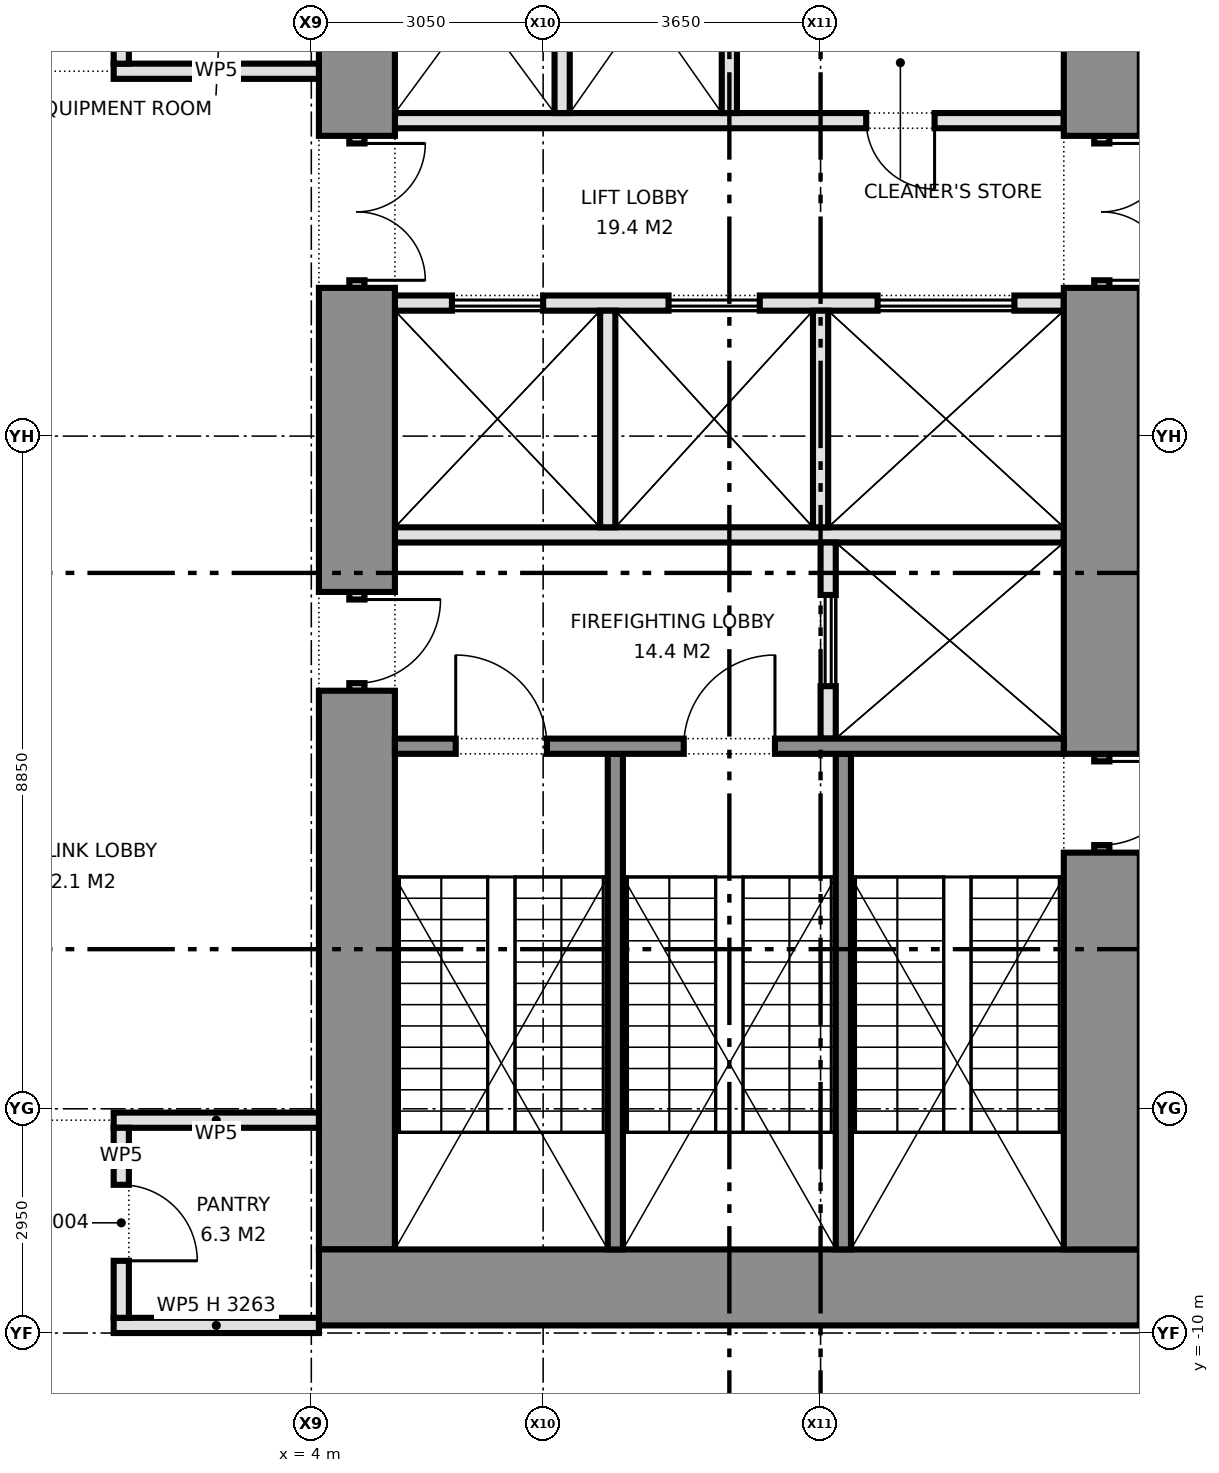
"""IFC4 building model, lengths in metres.
Left out: names, types, materials, properties, quantities, classifications, styles, units other than length and angle.
Written with IfcOpenShell. Run it as: python <this file> out.ifc"""

import sys

from ifc_helpers import new_model, si_unit, direction, frame, frame_2d, origin, place, context, subcontext, project, spatial, rectangle, extrude, element, fill, save


model = new_model("IFC4")
c1 = context("Model", 3, precision=1e-05, world=origin(), true_north=direction((0.0, 1.0)))
c2 = subcontext(c1, "Body", "Model", "MODEL_VIEW")
j1 = project(units=[si_unit("LENGTHUNIT", "METRE"), si_unit("PLANEANGLEUNIT", "RADIAN")], contexts=[c1])
p1 = place(None, origin())
s1 = spatial("IfcSite", under=j1, at=p1, CompositionType="ELEMENT")
p2 = place(p1, origin())
s2 = spatial("IfcBuilding", under=s1, at=p2, CompositionType="ELEMENT")
p3 = place(p2, frame((0.0, 0.0, 104.0)))
s3 = spatial("IfcBuildingStorey", under=s2, at=p3, CompositionType="ELEMENT", Elevation=104.0)
p4 = place(p3, frame((14.9, -9.4, 0.0), z_axis=(0.0, 0.0, 1.0), x_axis=(-1.0, 0.0, 0.0)))
e1 = element("IfcWall", 1, at=p4, inside=s3, PredefinedType="SHEAR", context=c2, shape_type="SweptSolid", body=[
    extrude(rectangle(XDim=10.8, YDim=1.0, at=frame_2d((5.4, 0.0))), origin(), (0.0, 0.0, 1.0), 4.2),
])
p5 = place(p3, frame((14.4, 8.9, 0.0), z_axis=(0.0, 0.0, 1.0), x_axis=(0.0, -1.0, 0.0)))
e2 = element("IfcWall", 2, at=p5, inside=s3, PredefinedType="SHEAR", context=c2, shape_type="SweptSolid", body=[
    extrude(rectangle(XDim=3.15, YDim=1.0, at=frame_2d((1.575, 0.0))), origin(), (0.0, 0.0, 1.0), 4.2),
])
p6 = place(p3, frame((14.4, 5.75, 0.0), z_axis=(0.0, 0.0, 1.0), x_axis=(0.0, -1.0, 0.0)))
e3 = element("IfcWall", 3, at=p6, inside=s3, PredefinedType="PARTITIONING", context=c2, shape_type="SweptSolid", body=[
    extrude(rectangle(XDim=2.0, YDim=0.2, at=frame_2d((1.0, 0.0))), origin(), (0.0, 0.0, 1.0), 2.4),
])
p7 = place(p6, frame((0.1, 0.0, 0.0)))
e4 = element("IfcOpeningElement", 4, at=p7, cuts=e3, PredefinedType="OPENING", context=c2, shape_type="SweptSolid", body=[
    extrude(rectangle(XDim=1.8, YDim=2.1, at=frame_2d((0.9, 1.05))), frame((0.0, 0.11, 0.0), z_axis=(0.0, -1.0, 0.0), x_axis=(1.0, 0.0, 0.0)), (0.0, 0.0, 1.0), 0.22),
])
p8 = place(p3, frame((14.4, 3.75, 0.0), z_axis=(0.0, 0.0, 1.0), x_axis=(0.0, -1.0, 0.0)))
e5 = element("IfcWall", 5, at=p8, inside=s3, PredefinedType="SHEAR", context=c2, shape_type="SweptSolid", body=[
    extrude(rectangle(XDim=6.13, YDim=1.0, at=frame_2d((3.065, 0.0))), origin(), (0.0, 0.0, 1.0), 4.2),
])
p9 = place(p3, frame((14.4, -2.38, 0.0), z_axis=(0.0, 0.0, 1.0), x_axis=(0.0, -1.0, 0.0)))
e6 = element("IfcWall", 6, at=p9, inside=s3, PredefinedType="SHEAR", context=c2, shape_type="SweptSolid", body=[
    extrude(rectangle(XDim=1.3, YDim=0.2, at=frame_2d((0.65, 0.0))), origin(), (0.0, 0.0, 1.0), 2.4),
])
p10 = place(p9, frame((0.1, 0.0, 0.0)))
e7 = element("IfcOpeningElement", 7, at=p10, cuts=e6, PredefinedType="OPENING", context=c2, shape_type="SweptSolid", body=[
    extrude(rectangle(XDim=1.1, YDim=2.1, at=frame_2d((0.55, 1.05))), frame((0.0, 0.11, 0.0), z_axis=(0.0, -1.0, 0.0), x_axis=(1.0, 0.0, 0.0)), (0.0, 0.0, 1.0), 0.22),
])
p11 = place(p3, frame((14.4, -3.68, 0.0), z_axis=(0.0, 0.0, 1.0), x_axis=(0.0, -1.0, 0.0)))
e8 = element("IfcWall", 8, at=p11, inside=s3, PredefinedType="SHEAR", context=c2, shape_type="SweptSolid", body=[
    extrude(rectangle(XDim=5.22, YDim=1.0, at=frame_2d((2.61, 0.0))), origin(), (0.0, 0.0, 1.0), 4.2),
])
p12 = place(p3, frame((4.6, 8.9, 0.0), z_axis=(0.0, 0.0, 1.0), x_axis=(0.0, -1.0, 0.0)))
e9 = element("IfcWall", 9, at=p12, inside=s3, PredefinedType="SHEAR", context=c2, shape_type="SweptSolid", body=[
    extrude(rectangle(XDim=3.15, YDim=1.0, at=frame_2d((1.575, 0.0))), origin(), (0.0, 0.0, 1.0), 4.2),
])
p13 = place(p3, frame((4.6, 5.75, 0.0), z_axis=(0.0, 0.0, 1.0), x_axis=(0.0, -1.0, 0.0)))
e10 = element("IfcWall", 10, at=p13, inside=s3, PredefinedType="PARTITIONING", context=c2, shape_type="SweptSolid", body=[
    extrude(rectangle(XDim=2.0, YDim=0.2, at=frame_2d((1.0, 0.0))), origin(), (0.0, 0.0, 1.0), 2.4),
])
p14 = place(p13, frame((0.1, 0.0, 0.0)))
e11 = element("IfcOpeningElement", 11, at=p14, cuts=e10, PredefinedType="OPENING", context=c2, shape_type="SweptSolid", body=[
    extrude(rectangle(XDim=1.8, YDim=2.1, at=frame_2d((0.9, 1.05))), frame((0.0, 0.11, 0.0), z_axis=(0.0, -1.0, 0.0), x_axis=(1.0, 0.0, 0.0)), (0.0, 0.0, 1.0), 0.22),
])
p15 = place(p3, frame((4.6, 3.75, 0.0), z_axis=(0.0, 0.0, 1.0), x_axis=(0.0, -1.0, 0.0)))
e12 = element("IfcWall", 12, at=p15, inside=s3, PredefinedType="SHEAR", context=c2, shape_type="SweptSolid", body=[
    extrude(rectangle(XDim=4.0, YDim=1.0, at=frame_2d((2.0, 0.0))), origin(), (0.0, 0.0, 1.0), 4.2),
])
p16 = place(p3, frame((4.6, -0.25, 0.0), z_axis=(0.0, 0.0, 1.0), x_axis=(0.0, -1.0, 0.0)))
e13 = element("IfcWall", 13, at=p16, inside=s3, PredefinedType="PARTITIONING", context=c2, shape_type="SweptSolid", body=[
    extrude(rectangle(XDim=1.3, YDim=0.2, at=frame_2d((0.65, 0.0))), origin(), (0.0, 0.0, 1.0), 2.4),
])
p17 = place(p16, frame((0.1, 0.0, 0.0)))
e14 = element("IfcOpeningElement", 14, at=p17, cuts=e13, PredefinedType="OPENING", context=c2, shape_type="SweptSolid", body=[
    extrude(rectangle(XDim=1.1, YDim=2.1, at=frame_2d((0.55, 1.05))), frame((0.0, 0.11, 0.0), z_axis=(0.0, -1.0, 0.0), x_axis=(1.0, 0.0, 0.0)), (0.0, 0.0, 1.0), 0.22),
])
p18 = place(p3, frame((4.6, -1.55, 0.0), z_axis=(0.0, 0.0, 1.0), x_axis=(0.0, -1.0, 0.0)))
e15 = element("IfcWall", 15, at=p18, inside=s3, PredefinedType="SHEAR", context=c2, shape_type="SweptSolid", body=[
    extrude(rectangle(XDim=7.35, YDim=1.0, at=frame_2d((3.675, 0.0))), origin(), (0.0, 0.0, 1.0), 4.2),
])
p19 = place(p3, frame((13.9, 5.95, 0.0), z_axis=(0.0, 0.0, 1.0), x_axis=(-1.0, 0.0, 0.0)))
e16 = element("IfcWall", 16, at=p19, inside=s3, PredefinedType="PARTITIONING", context=c2, shape_type="SweptSolid", body=[
    extrude(rectangle(XDim=8.8, YDim=0.2, at=frame_2d((4.4, 0.0))), origin(), (0.0, 0.0, 1.0), 4.2),
])
p20 = place(p19, frame((1.7, 0.0, 0.0)))
e17 = element("IfcOpeningElement", 17, at=p20, cuts=e16, PredefinedType="OPENING", context=c2, shape_type="SweptSolid", body=[
    extrude(rectangle(XDim=0.9, YDim=2.1, at=frame_2d((0.45, 1.05))), frame((0.0, 0.11, 0.0), z_axis=(0.0, -1.0, 0.0), x_axis=(1.0, 0.0, 0.0)), (0.0, 0.0, 1.0), 0.22),
])
p21 = place(p3, frame((13.9, 3.55, 0.0), z_axis=(0.0, 0.0, 1.0), x_axis=(-1.0, 0.0, 0.0)))
e18 = element("IfcWall", 18, at=p21, inside=s3, PredefinedType="PARTITIONING", context=c2, shape_type="SweptSolid", body=[
    extrude(rectangle(XDim=8.8, YDim=0.2, at=frame_2d((4.4, 0.0))), origin(), (0.0, 0.0, 1.0), 4.2),
])
p22 = place(p21, frame((0.65, 0.0, 0.0)))
e19 = element("IfcOpeningElement", 19, at=p22, cuts=e18, PredefinedType="OPENING", context=c2, shape_type="SweptSolid", body=[
    extrude(rectangle(XDim=1.8, YDim=2.1, at=frame_2d((0.9, 1.05))), frame((0.0, 0.11, 0.0), z_axis=(0.0, -1.0, 0.0), x_axis=(1.0, 0.0, 0.0)), (0.0, 0.0, 1.0), 0.22),
])
p23 = place(p21, frame((4.0, 0.0, 0.0)))
e20 = element("IfcOpeningElement", 20, at=p23, cuts=e18, PredefinedType="OPENING", context=c2, shape_type="SweptSolid", body=[
    extrude(rectangle(XDim=1.2, YDim=2.1, at=frame_2d((0.6, 1.05))), frame((0.0, 0.11, 0.0), z_axis=(0.0, -1.0, 0.0), x_axis=(1.0, 0.0, 0.0)), (0.0, 0.0, 1.0), 0.22),
])
p24 = place(p21, frame((6.85, 0.0, 0.0)))
e21 = element("IfcOpeningElement", 21, at=p24, cuts=e18, PredefinedType="OPENING", context=c2, shape_type="SweptSolid", body=[
    extrude(rectangle(XDim=1.2, YDim=2.1, at=frame_2d((0.6, 1.05))), frame((0.0, 0.11, 0.0), z_axis=(0.0, -1.0, 0.0), x_axis=(1.0, 0.0, 0.0)), (0.0, 0.0, 1.0), 0.22),
])
p25 = place(p3, frame((13.9, 0.5, 0.0), z_axis=(0.0, 0.0, 1.0), x_axis=(-1.0, 0.0, 0.0)))
e22 = element("IfcWall", 22, at=p25, inside=s3, PredefinedType="PARTITIONING", context=c2, shape_type="SweptSolid", body=[
    extrude(rectangle(XDim=8.8, YDim=0.2, at=frame_2d((4.4, 0.0))), origin(), (0.0, 0.0, 1.0), 4.2),
])
p26 = place(p3, frame((10.8, 0.4, 0.0), z_axis=(0.0, 0.0, 1.0), x_axis=(0.0, -1.0, 0.0)))
e23 = element("IfcWall", 23, at=p26, inside=s3, PredefinedType="PARTITIONING", context=c2, shape_type="SweptSolid", body=[
    extrude(rectangle(XDim=2.58, YDim=0.2, at=frame_2d((1.29, 0.0))), origin(), (0.0, 0.0, 1.0), 4.2),
])
p27 = place(p26, frame((0.69, 0.0, 0.0)))
e24 = element("IfcOpeningElement", 24, at=p27, cuts=e23, PredefinedType="OPENING", context=c2, shape_type="SweptSolid", body=[
    extrude(rectangle(XDim=1.2, YDim=2.1, at=frame_2d((0.6, 1.05))), frame((0.0, 0.11, 0.0), z_axis=(0.0, -1.0, 0.0), x_axis=(1.0, 0.0, 0.0)), (0.0, 0.0, 1.0), 0.22),
])
p28 = place(p3, frame((13.9, -2.28, 0.0), z_axis=(0.0, 0.0, 1.0), x_axis=(-1.0, 0.0, 0.0)))
e25 = element("IfcWall", 25, at=p28, inside=s3, PredefinedType="SHEAR", context=c2, shape_type="SweptSolid", body=[
    extrude(rectangle(XDim=8.8, YDim=0.2, at=frame_2d((4.4, 0.0))), origin(), (0.0, 0.0, 1.0), 4.2),
])
p29 = place(p28, frame((3.8, 0.0, 0.0)))
e26 = element("IfcOpeningElement", 26, at=p29, cuts=e25, PredefinedType="OPENING", context=c2, shape_type="SweptSolid", body=[
    extrude(rectangle(XDim=1.2, YDim=2.1, at=frame_2d((0.6, 1.05))), frame((0.0, 0.11, 0.0), z_axis=(0.0, -1.0, 0.0), x_axis=(1.0, 0.0, 0.0)), (0.0, 0.0, 1.0), 0.22),
])
p30 = place(p28, frame((6.8, 0.0, 0.0)))
e27 = element("IfcOpeningElement", 27, at=p30, cuts=e25, PredefinedType="OPENING", context=c2, shape_type="SweptSolid", body=[
    extrude(rectangle(XDim=1.2, YDim=2.1, at=frame_2d((0.6, 1.05))), frame((0.0, 0.11, 0.0), z_axis=(0.0, -1.0, 0.0), x_axis=(1.0, 0.0, 0.0)), (0.0, 0.0, 1.0), 0.22),
])
for number, where, z_axis, x_axis in (
    (28, (11.0, -2.38, 0.0), (0.0, 0.0, 1.0), (0.0, -1.0, 0.0)),
    (29, (8.0, -2.38, 0.0), (0.0, 0.0, 1.0), (0.0, -1.0, 0.0)),
):
    element("IfcWall", number, at=place(p3, frame(where, z_axis=z_axis, x_axis=x_axis)), inside=s3, PredefinedType="SHEAR", context=c2, shape_type="SweptSolid", body=[
        extrude(rectangle(XDim=6.52, YDim=0.2, at=frame_2d((3.26, 0.0))), origin(), (0.0, 0.0, 1.0), 4.2),
    ])
for number, where, z_axis, x_axis in (
    (30, (9.5, 8.9, 0.0), (0.0, 0.0, 1.0), (0.0, -1.0, 0.0)),
    (31, (7.3, 8.9, 0.0), (0.0, 0.0, 1.0), (0.0, -1.0, 0.0)),
    (32, (10.7, 3.45, 0.0), (0.0, 0.0, 1.0), (0.0, -1.0, 0.0)),
    (33, (7.9, 3.45, 0.0), (0.0, 0.0, 1.0), (0.0, -1.0, 0.0)),
):
    element("IfcWall", number, at=place(p3, frame(where, z_axis=z_axis, x_axis=x_axis)), inside=s3, PredefinedType="PARTITIONING", context=c2, shape_type="SweptSolid", body=[
        extrude(rectangle(XDim=2.85, YDim=0.2, at=frame_2d((1.425, 0.0))), origin(), (0.0, 0.0, 1.0), 4.2),
    ])
p31 = place(p3, frame((1.4, -9.9, 0.0), z_axis=(0.0, 0.0, 1.0), x_axis=(1.0, 0.0, 0.0)))
e34 = element("IfcWall", 34, at=p31, inside=s3, PredefinedType="PARTITIONING", context=c2, shape_type="SweptSolid", body=[
    extrude(rectangle(XDim=2.7, YDim=0.2, at=frame_2d((1.35, 0.0))), origin(), (0.0, 0.0, 1.0), 3.263),
])
for number, where, z_axis, x_axis in (
    (35, (1.4, -7.2, 0.0), (0.0, 0.0, 1.0), (1.0, 0.0, 0.0)),
    (36, (1.4, 6.6, 0.0), (0.0, 0.0, 1.0), (1.0, 0.0, 0.0)),
):
    element("IfcWall", number, at=place(p3, frame(where, z_axis=z_axis, x_axis=x_axis)), inside=s3, PredefinedType="PARTITIONING", context=c2, shape_type="SweptSolid", body=[
        extrude(rectangle(XDim=2.7, YDim=0.2, at=frame_2d((1.35, 0.0))), origin(), (0.0, 0.0, 1.0), 4.2),
    ])
p32 = place(p3, frame((1.5, -9.8, 0.0), z_axis=(0.0, 0.0, 1.0), x_axis=(0.0, 1.0, 0.0)))
e37 = element("IfcWall", 37, at=p32, inside=s3, PredefinedType="PARTITIONING", context=c2, shape_type="SweptSolid", body=[
    extrude(rectangle(XDim=2.5, YDim=0.2, at=frame_2d((1.25, 0.0))), origin(), (0.0, 0.0, 1.0), 4.2),
])
p33 = place(p32, frame((0.75, 0.0, 0.0)))
e38 = element("IfcOpeningElement", 38, at=p33, cuts=e37, PredefinedType="OPENING", context=c2, shape_type="SweptSolid", body=[
    extrude(rectangle(XDim=1.0, YDim=2.1, at=frame_2d((0.5, 1.05))), frame((0.0, 0.11, 0.0), z_axis=(0.0, -1.0, 0.0), x_axis=(1.0, 0.0, 0.0)), (0.0, 0.0, 1.0), 0.22),
])
p34 = place(p3, frame((1.5, 6.7, 0.0), z_axis=(0.0, 0.0, 1.0), x_axis=(0.0, 1.0, 0.0)))
e39 = element("IfcWall", 39, at=p34, inside=s3, PredefinedType="PARTITIONING", context=c2, shape_type="SweptSolid", body=[
    extrude(rectangle(XDim=3.1, YDim=0.2, at=frame_2d((1.55, 0.0))), origin(), (0.0, 0.0, 1.0), 4.2),
])
p35 = place(p34, frame((0.95, 0.0, 0.0)))
e40 = element("IfcOpeningElement", 40, at=p35, cuts=e39, PredefinedType="OPENING", context=c2, shape_type="SweptSolid", body=[
    extrude(rectangle(XDim=1.2, YDim=2.1, at=frame_2d((0.6, 1.05))), frame((0.0, 0.11, 0.0), z_axis=(0.0, -1.0, 0.0), x_axis=(1.0, 0.0, 0.0)), (0.0, 0.0, 1.0), 0.22),
])
p36 = place(p7, origin())
e41 = element("IfcDoor", 41, at=p36, inside=s3, OperationType="DOUBLE_DOOR_SINGLE_SWING", PredefinedType="DOOR", context=c2, shape_type="SweptSolid", body=[
    extrude(rectangle(XDim=1.8, YDim=2.1, at=frame_2d((0.9, 1.05))), frame((0.0, 0.025, 0.0), z_axis=(0.0, -1.0, 0.0), x_axis=(1.0, 0.0, 0.0)), (0.0, 0.0, 1.0), 0.05),
])
fill(e4, e41)
p37 = place(p10, origin())
e42 = element("IfcDoor", 42, at=p37, inside=s3, OperationType="SINGLE_SWING_LEFT", PredefinedType="DOOR", context=c2, shape_type="SweptSolid", body=[
    extrude(rectangle(XDim=1.1, YDim=2.1, at=frame_2d((0.55, 1.05))), frame((0.0, 0.025, 0.0), z_axis=(0.0, -1.0, 0.0), x_axis=(1.0, 0.0, 0.0)), (0.0, 0.0, 1.0), 0.05),
])
fill(e7, e42)
p38 = place(p14, origin())
e43 = element("IfcDoor", 43, at=p38, inside=s3, OperationType="DOUBLE_DOOR_SINGLE_SWING", PredefinedType="DOOR", context=c2, shape_type="SweptSolid", body=[
    extrude(rectangle(XDim=1.8, YDim=2.1, at=frame_2d((0.9, 1.05))), frame((0.0, 0.025, 0.0), z_axis=(0.0, -1.0, 0.0), x_axis=(1.0, 0.0, 0.0)), (0.0, 0.0, 1.0), 0.05),
])
fill(e11, e43)
p39 = place(p17, origin())
e44 = element("IfcDoor", 44, at=p39, inside=s3, OperationType="SINGLE_SWING_LEFT", PredefinedType="DOOR", context=c2, shape_type="SweptSolid", body=[
    extrude(rectangle(XDim=1.1, YDim=2.1, at=frame_2d((0.55, 1.05))), frame((0.0, 0.025, 0.0), z_axis=(0.0, -1.0, 0.0), x_axis=(1.0, 0.0, 0.0)), (0.0, 0.0, 1.0), 0.05),
])
fill(e14, e44)
p40 = place(p22, origin())
e45 = element("IfcDoor", 45, at=p40, inside=s3, OperationType="DOUBLE_DOOR_SLIDING", PredefinedType="DOOR", context=c2, shape_type="SweptSolid", body=[
    extrude(rectangle(XDim=1.8, YDim=2.1, at=frame_2d((0.9, 1.05))), frame((0.0, 0.025, 0.0), z_axis=(0.0, -1.0, 0.0), x_axis=(1.0, 0.0, 0.0)), (0.0, 0.0, 1.0), 0.05),
])
fill(e19, e45)
p41 = place(p23, origin())
e46 = element("IfcDoor", 46, at=p41, inside=s3, OperationType="DOUBLE_DOOR_SLIDING", PredefinedType="DOOR", context=c2, shape_type="SweptSolid", body=[
    extrude(rectangle(XDim=1.2, YDim=2.1, at=frame_2d((0.6, 1.05))), frame((0.0, 0.025, 0.0), z_axis=(0.0, -1.0, 0.0), x_axis=(1.0, 0.0, 0.0)), (0.0, 0.0, 1.0), 0.05),
])
fill(e20, e46)
p42 = place(p24, origin())
e47 = element("IfcDoor", 47, at=p42, inside=s3, OperationType="DOUBLE_DOOR_SLIDING", PredefinedType="DOOR", context=c2, shape_type="SweptSolid", body=[
    extrude(rectangle(XDim=1.2, YDim=2.1, at=frame_2d((0.6, 1.05))), frame((0.0, 0.025, 0.0), z_axis=(0.0, -1.0, 0.0), x_axis=(1.0, 0.0, 0.0)), (0.0, 0.0, 1.0), 0.05),
])
fill(e21, e47)
p43 = place(p27, origin())
e48 = element("IfcDoor", 48, at=p43, inside=s3, OperationType="DOUBLE_DOOR_SLIDING", PredefinedType="DOOR", context=c2, shape_type="SweptSolid", body=[
    extrude(rectangle(XDim=1.2, YDim=2.1, at=frame_2d((0.6, 1.05))), frame((0.0, 0.025, 0.0), z_axis=(0.0, -1.0, 0.0), x_axis=(1.0, 0.0, 0.0)), (0.0, 0.0, 1.0), 0.05),
])
fill(e24, e48)
p44 = place(p20, origin())
e49 = element("IfcDoor", 49, at=p44, inside=s3, OperationType="SINGLE_SWING_LEFT", PredefinedType="DOOR", context=c2, shape_type="SweptSolid", body=[
    extrude(rectangle(XDim=0.9, YDim=2.1, at=frame_2d((0.45, 1.05))), frame((0.0, 0.025, 0.0), z_axis=(0.0, -1.0, 0.0), x_axis=(1.0, 0.0, 0.0)), (0.0, 0.0, 1.0), 0.05),
])
fill(e17, e49)
p45 = place(p29, frame((1.2, 0.0, 0.0), z_axis=(0.0, 0.0, 1.0), x_axis=(-1.0, 0.0, 0.0)))
e50 = element("IfcDoor", 50, at=p45, inside=s3, OperationType="SINGLE_SWING_RIGHT", PredefinedType="DOOR", context=c2, shape_type="SweptSolid", body=[
    extrude(rectangle(XDim=1.2, YDim=2.1, at=frame_2d((0.6, 1.05))), frame((0.0, 0.025, 0.0), z_axis=(0.0, -1.0, 0.0), x_axis=(1.0, 0.0, 0.0)), (0.0, 0.0, 1.0), 0.05),
])
fill(e26, e50)
p46 = place(p30, frame((1.2, 0.0, 0.0), z_axis=(0.0, 0.0, 1.0), x_axis=(-1.0, 0.0, 0.0)))
e51 = element("IfcDoor", 51, at=p46, inside=s3, OperationType="SINGLE_SWING_LEFT", PredefinedType="DOOR", context=c2, shape_type="SweptSolid", body=[
    extrude(rectangle(XDim=1.2, YDim=2.1, at=frame_2d((0.6, 1.05))), frame((0.0, 0.025, 0.0), z_axis=(0.0, -1.0, 0.0), x_axis=(1.0, 0.0, 0.0)), (0.0, 0.0, 1.0), 0.05),
])
fill(e27, e51)
p47 = place(p33, frame((1.0, 0.0, 0.0), z_axis=(0.0, 0.0, 1.0), x_axis=(-1.0, 0.0, 0.0)))
e52 = element("IfcDoor", 52, at=p47, inside=s3, OperationType="SINGLE_SWING_RIGHT", PredefinedType="DOOR", context=c2, shape_type="SweptSolid", body=[
    extrude(rectangle(XDim=1.0, YDim=2.1, at=frame_2d((0.5, 1.05))), frame((0.0, 0.025, 0.0), z_axis=(0.0, -1.0, 0.0), x_axis=(1.0, 0.0, 0.0)), (0.0, 0.0, 1.0), 0.05),
])
fill(e38, e52)
save(model, sys.argv[1])
